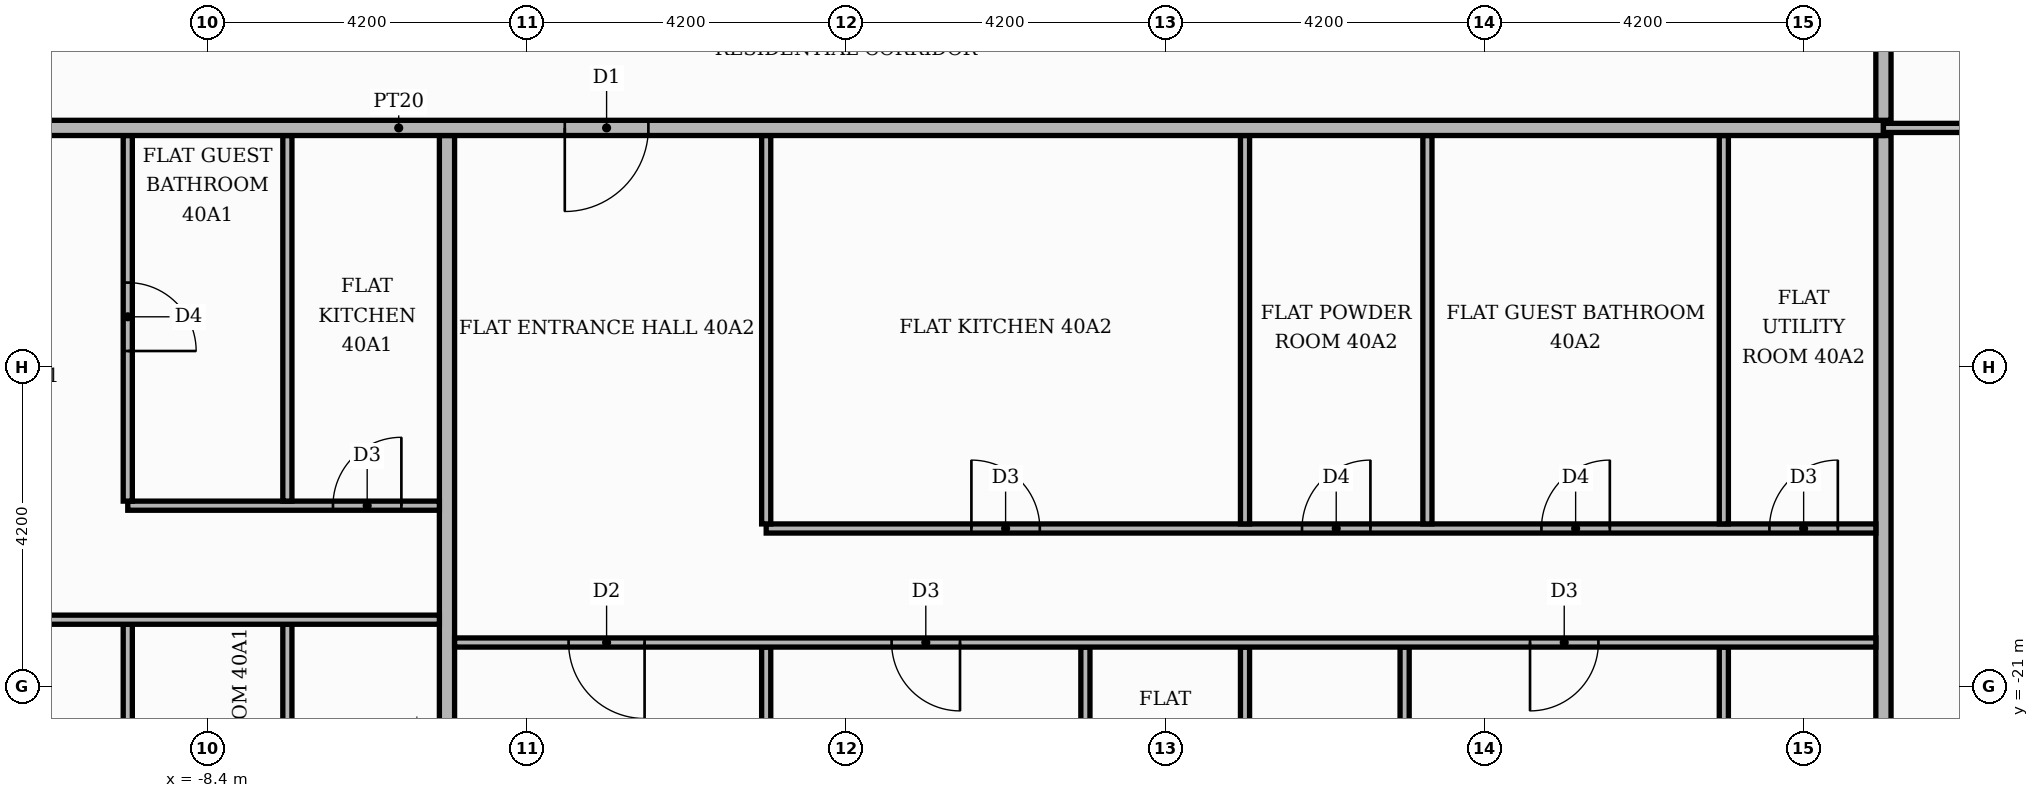
"""IFC4 building model, lengths in metres.
Left out: names, types, materials, properties, quantities, classifications, styles, units other than length and angle.
Written with IfcOpenShell. Run it as: python <this file> out.ifc"""

import sys

from ifc_helpers import new_model, si_unit, direction, frame, frame_2d, origin, place, context, subcontext, project, spatial, rectangle, extrude, element, fill, save


model = new_model("IFC4")
c1 = context("Model", 3, precision=1e-05, world=origin(), true_north=direction((0.0, 1.0)))
c2 = subcontext(c1, "Body", "Model", "MODEL_VIEW")
j1 = project(units=[si_unit("LENGTHUNIT", "METRE"), si_unit("PLANEANGLEUNIT", "RADIAN")], contexts=[c1])
p1 = place(None, origin())
s1 = spatial("IfcSite", under=j1, at=p1, CompositionType="ELEMENT")
p2 = place(p1, origin())
s2 = spatial("IfcBuilding", under=s1, at=p2, CompositionType="ELEMENT")
p3 = place(p2, frame((0.0, 0.0, 168.9)))
s3 = spatial("IfcBuildingStorey", under=s2, at=p3, CompositionType="ELEMENT", Elevation=168.9)
p4 = place(p3, frame((-9.45, -25.42, 0.0), z_axis=(0.0, 0.0, 1.0), x_axis=(0.0, 1.0, 0.0)))
e1 = element("IfcWall", 1, at=p4, inside=s3, PredefinedType="PARTITIONING", context=c2, shape_type="SweptSolid", body=[
    extrude(rectangle(XDim=5.24, YDim=0.12, at=frame_2d((2.62, 0.0))), origin(), (0.0, 0.0, 1.0), 3.48),
])
p5 = place(p4, frame((2.05, 0.0, 0.0)))
e2 = element("IfcOpeningElement", 2, at=p5, cuts=e1, PredefinedType="OPENING", context=c2, shape_type="SweptSolid", body=[
    extrude(rectangle(XDim=0.9, YDim=2.1, at=frame_2d((0.45, 1.05))), frame((0.0, 0.07, 0.0), z_axis=(0.0, -1.0, 0.0), x_axis=(1.0, 0.0, 0.0)), (0.0, 0.0, 1.0), 0.14),
])
p6 = place(p3, frame((-7.35, -25.42, 0.0), z_axis=(0.0, 0.0, 1.0), x_axis=(0.0, 1.0, 0.0)))
e3 = element("IfcWall", 3, at=p6, inside=s3, PredefinedType="PARTITIONING", context=c2, shape_type="SweptSolid", body=[
    extrude(rectangle(XDim=5.24, YDim=0.12, at=frame_2d((2.62, 0.0))), origin(), (0.0, 0.0, 1.0), 3.48),
])
p7 = place(p6, frame((2.05, 0.0, 0.0)))
e4 = element("IfcOpeningElement", 4, at=p7, cuts=e3, PredefinedType="OPENING", context=c2, shape_type="SweptSolid", body=[
    extrude(rectangle(XDim=0.9, YDim=2.1, at=frame_2d((0.45, 1.05))), frame((0.0, 0.07, 0.0), z_axis=(0.0, -1.0, 0.0), x_axis=(1.0, 0.0, 0.0)), (0.0, 0.0, 1.0), 0.14),
])
p8 = place(p3, frame((-5.25, -25.42, 0.0), z_axis=(0.0, 0.0, 1.0), x_axis=(0.0, 1.0, 0.0)))
e5 = element("IfcWall", 5, at=p8, inside=s3, PredefinedType="PARTITIONING", context=c2, shape_type="SweptSolid", body=[
    extrude(rectangle(XDim=11.67, YDim=0.2, at=frame_2d((5.835, 0.0))), origin(), (0.0, 0.0, 1.0), 3.48),
])
p9 = place(p3, frame((-1.05, -25.42, 0.0), z_axis=(0.0, 0.0, 1.0), x_axis=(0.0, 1.0, 0.0)))
e6 = element("IfcWall", 6, at=p9, inside=s3, PredefinedType="PARTITIONING", context=c2, shape_type="SweptSolid", body=[
    extrude(rectangle(XDim=4.94, YDim=0.12, at=frame_2d((2.47, 0.0))), origin(), (0.0, 0.0, 1.0), 3.48),
])
p10 = place(p3, frame((3.15, -25.42, 0.0), z_axis=(0.0, 0.0, 1.0), x_axis=(0.0, 1.0, 0.0)))
e7 = element("IfcWall", 7, at=p10, inside=s3, PredefinedType="PARTITIONING", context=c2, shape_type="SweptSolid", body=[
    extrude(rectangle(XDim=4.94, YDim=0.12, at=frame_2d((2.47, 0.0))), origin(), (0.0, 0.0, 1.0), 3.48),
])
p11 = place(p10, frame((1.9, 0.0, 0.0)))
e8 = element("IfcOpeningElement", 8, at=p11, cuts=e7, PredefinedType="OPENING", context=c2, shape_type="SweptSolid", body=[
    extrude(rectangle(XDim=0.9, YDim=2.1, at=frame_2d((0.45, 1.05))), frame((0.0, 0.07, 0.0), z_axis=(0.0, -1.0, 0.0), x_axis=(1.0, 0.0, 0.0)), (0.0, 0.0, 1.0), 0.14),
])
p12 = place(p3, frame((5.25, -25.42, 0.0), z_axis=(0.0, 0.0, 1.0), x_axis=(0.0, 1.0, 0.0)))
e9 = element("IfcWall", 9, at=p12, inside=s3, PredefinedType="PARTITIONING", context=c2, shape_type="SweptSolid", body=[
    extrude(rectangle(XDim=4.94, YDim=0.12, at=frame_2d((2.47, 0.0))), origin(), (0.0, 0.0, 1.0), 3.48),
])
p13 = place(p12, frame((1.9, 0.0, 0.0)))
e10 = element("IfcOpeningElement", 10, at=p13, cuts=e9, PredefinedType="OPENING", context=c2, shape_type="SweptSolid", body=[
    extrude(rectangle(XDim=0.9, YDim=2.1, at=frame_2d((0.45, 1.05))), frame((0.0, 0.07, 0.0), z_axis=(0.0, -1.0, 0.0), x_axis=(1.0, 0.0, 0.0)), (0.0, 0.0, 1.0), 0.14),
])
p14 = place(p3, frame((7.35, -25.42, 0.0), z_axis=(0.0, 0.0, 1.0), x_axis=(0.0, 1.0, 0.0)))
e11 = element("IfcWall", 11, at=p14, inside=s3, PredefinedType="PARTITIONING", context=c2, shape_type="SweptSolid", body=[
    extrude(rectangle(XDim=4.94, YDim=0.12, at=frame_2d((2.47, 0.0))), origin(), (0.0, 0.0, 1.0), 3.48),
])
p15 = place(p3, frame((11.55, -25.42, 0.0), z_axis=(0.0, 0.0, 1.0), x_axis=(0.0, 1.0, 0.0)))
e12 = element("IfcWall", 12, at=p15, inside=s3, PredefinedType="PARTITIONING", context=c2, shape_type="SweptSolid", body=[
    extrude(rectangle(XDim=4.94, YDim=0.12, at=frame_2d((2.47, 0.0))), origin(), (0.0, 0.0, 1.0), 3.48),
])
p16 = place(p15, frame((1.9, 0.0, 0.0)))
e13 = element("IfcOpeningElement", 13, at=p16, cuts=e12, PredefinedType="OPENING", context=c2, shape_type="SweptSolid", body=[
    extrude(rectangle(XDim=0.9, YDim=2.1, at=frame_2d((0.45, 1.05))), frame((0.0, 0.07, 0.0), z_axis=(0.0, -1.0, 0.0), x_axis=(1.0, 0.0, 0.0)), (0.0, 0.0, 1.0), 0.14),
])
p17 = place(p3, frame((13.65, -25.42, 0.0), z_axis=(0.0, 0.0, 1.0), x_axis=(0.0, 1.0, 0.0)))
e14 = element("IfcWall", 14, at=p17, inside=s3, PredefinedType="PARTITIONING", context=c2, shape_type="SweptSolid", body=[
    extrude(rectangle(XDim=11.67, YDim=0.2, at=frame_2d((5.835, 0.0))), origin(), (0.0, 0.0, 1.0), 3.48),
])
p18 = place(p3, frame((-5.15, -20.42, 0.0), z_axis=(0.0, 0.0, 1.0), x_axis=(1.0, 0.0, 0.0)))
e15 = element("IfcWall", 15, at=p18, inside=s3, PredefinedType="PARTITIONING", context=c2, shape_type="SweptSolid", body=[
    extrude(rectangle(XDim=18.7, YDim=0.12, at=frame_2d((9.35, 0.0))), origin(), (0.0, 0.0, 1.0), 3.48),
])
p19 = place(p18, frame((1.5, 0.0, 0.0)))
e16 = element("IfcOpeningElement", 16, at=p19, cuts=e15, PredefinedType="OPENING", context=c2, shape_type="SweptSolid", body=[
    extrude(rectangle(XDim=1.0, YDim=2.1, at=frame_2d((0.5, 1.05))), frame((0.0, 0.07, 0.0), z_axis=(0.0, -1.0, 0.0), x_axis=(1.0, 0.0, 0.0)), (0.0, 0.0, 1.0), 0.14),
])
p20 = place(p18, frame((5.75, 0.0, 0.0)))
e17 = element("IfcOpeningElement", 17, at=p20, cuts=e15, PredefinedType="OPENING", context=c2, shape_type="SweptSolid", body=[
    extrude(rectangle(XDim=0.9, YDim=2.1, at=frame_2d((0.45, 1.05))), frame((0.0, 0.07, 0.0), z_axis=(0.0, -1.0, 0.0), x_axis=(1.0, 0.0, 0.0)), (0.0, 0.0, 1.0), 0.14),
])
p21 = place(p18, frame((14.15, 0.0, 0.0)))
e18 = element("IfcOpeningElement", 18, at=p21, cuts=e15, PredefinedType="OPENING", context=c2, shape_type="SweptSolid", body=[
    extrude(rectangle(XDim=0.9, YDim=2.1, at=frame_2d((0.45, 1.05))), frame((0.0, 0.07, 0.0), z_axis=(0.0, -1.0, 0.0), x_axis=(1.0, 0.0, 0.0)), (0.0, 0.0, 1.0), 0.14),
])
p22 = place(p3, frame((-25.42, -20.12, 0.0), z_axis=(0.0, 0.0, 1.0), x_axis=(1.0, 0.0, 0.0)))
e19 = element("IfcWall", 19, at=p22, inside=s3, PredefinedType="PARTITIONING", context=c2, shape_type="SweptSolid", body=[
    extrude(rectangle(XDim=20.07, YDim=0.12, at=frame_2d((10.035, 0.0))), origin(), (0.0, 0.0, 1.0), 3.48),
])
p23 = place(p22, frame((10.22, 0.0, 0.0)))
e20 = element("IfcOpeningElement", 20, at=p23, cuts=e19, PredefinedType="OPENING", context=c2, shape_type="SweptSolid", body=[
    extrude(rectangle(XDim=1.0, YDim=2.1, at=frame_2d((0.5, 1.05))), frame((0.0, 0.07, 0.0), z_axis=(0.0, -1.0, 0.0), x_axis=(1.0, 0.0, 0.0)), (0.0, 0.0, 1.0), 0.14),
])
p24 = place(p22, frame((13.42, 0.0, 0.0)))
e21 = element("IfcOpeningElement", 21, at=p24, cuts=e19, PredefinedType="OPENING", context=c2, shape_type="SweptSolid", body=[
    extrude(rectangle(XDim=0.9, YDim=2.1, at=frame_2d((0.45, 1.05))), frame((0.0, 0.07, 0.0), z_axis=(0.0, -1.0, 0.0), x_axis=(1.0, 0.0, 0.0)), (0.0, 0.0, 1.0), 0.14),
])
p25 = place(p3, frame((-1.05, -18.92, 0.0), z_axis=(0.0, 0.0, 1.0), x_axis=(1.0, 0.0, 0.0)))
e22 = element("IfcWall", 22, at=p25, inside=s3, PredefinedType="PARTITIONING", context=c2, shape_type="SweptSolid", body=[
    extrude(rectangle(XDim=14.6, YDim=0.12, at=frame_2d((7.3, 0.0))), origin(), (0.0, 0.0, 1.0), 3.48),
])
p26 = place(p25, frame((2.7, 0.0, 0.0)))
e23 = element("IfcOpeningElement", 23, at=p26, cuts=e22, PredefinedType="OPENING", context=c2, shape_type="SweptSolid", body=[
    extrude(rectangle(XDim=0.9, YDim=2.1, at=frame_2d((0.45, 1.05))), frame((0.0, 0.07, 0.0), z_axis=(0.0, -1.0, 0.0), x_axis=(1.0, 0.0, 0.0)), (0.0, 0.0, 1.0), 0.14),
])
p27 = place(p25, frame((7.05, 0.0, 0.0)))
e24 = element("IfcOpeningElement", 24, at=p27, cuts=e22, PredefinedType="OPENING", context=c2, shape_type="SweptSolid", body=[
    extrude(rectangle(XDim=0.9, YDim=2.1, at=frame_2d((0.45, 1.05))), frame((0.0, 0.07, 0.0), z_axis=(0.0, -1.0, 0.0), x_axis=(1.0, 0.0, 0.0)), (0.0, 0.0, 1.0), 0.14),
])
p28 = place(p25, frame((10.2, 0.0, 0.0)))
e25 = element("IfcOpeningElement", 25, at=p28, cuts=e22, PredefinedType="OPENING", context=c2, shape_type="SweptSolid", body=[
    extrude(rectangle(XDim=0.9, YDim=2.1, at=frame_2d((0.45, 1.05))), frame((0.0, 0.07, 0.0), z_axis=(0.0, -1.0, 0.0), x_axis=(1.0, 0.0, 0.0)), (0.0, 0.0, 1.0), 0.14),
])
p29 = place(p25, frame((13.2, 0.0, 0.0)))
e26 = element("IfcOpeningElement", 26, at=p29, cuts=e22, PredefinedType="OPENING", context=c2, shape_type="SweptSolid", body=[
    extrude(rectangle(XDim=0.9, YDim=2.1, at=frame_2d((0.45, 1.05))), frame((0.0, 0.07, 0.0), z_axis=(0.0, -1.0, 0.0), x_axis=(1.0, 0.0, 0.0)), (0.0, 0.0, 1.0), 0.14),
])
for number, where, z_axis, x_axis in (
    (27, (-1.05, -18.86, 0.0), (0.0, 0.0, 1.0), (0.0, 1.0, 0.0)),
    (28, (5.25, -18.86, 0.0), (0.0, 0.0, 1.0), (0.0, 1.0, 0.0)),
    (29, (7.65, -18.86, 0.0), (0.0, 0.0, 1.0), (0.0, 1.0, 0.0)),
    (30, (11.55, -18.86, 0.0), (0.0, 0.0, 1.0), (0.0, 1.0, 0.0)),
):
    element("IfcWall", number, at=place(p3, frame(where, z_axis=z_axis, x_axis=x_axis)), inside=s3, PredefinedType="PARTITIONING", context=c2, shape_type="SweptSolid", body=[
        extrude(rectangle(XDim=5.11, YDim=0.12, at=frame_2d((2.555, 0.0))), origin(), (0.0, 0.0, 1.0), 3.48),
    ])
p30 = place(p3, frame((-9.45, -18.62, 0.0), z_axis=(0.0, 0.0, 1.0), x_axis=(1.0, 0.0, 0.0)))
e31 = element("IfcWall", 31, at=p30, inside=s3, PredefinedType="PARTITIONING", context=c2, shape_type="SweptSolid", body=[
    extrude(rectangle(XDim=4.1, YDim=0.12, at=frame_2d((2.05, 0.0))), origin(), (0.0, 0.0, 1.0), 3.48),
])
p31 = place(p30, frame((2.7, 0.0, 0.0)))
e32 = element("IfcOpeningElement", 32, at=p31, cuts=e31, PredefinedType="OPENING", context=c2, shape_type="SweptSolid", body=[
    extrude(rectangle(XDim=0.9, YDim=2.1, at=frame_2d((0.45, 1.05))), frame((0.0, 0.07, 0.0), z_axis=(0.0, -1.0, 0.0), x_axis=(1.0, 0.0, 0.0)), (0.0, 0.0, 1.0), 0.14),
])
p32 = place(p3, frame((-9.45, -18.56, 0.0), z_axis=(0.0, 0.0, 1.0), x_axis=(0.0, 1.0, 0.0)))
e33 = element("IfcWall", 33, at=p32, inside=s3, PredefinedType="PARTITIONING", context=c2, shape_type="SweptSolid", body=[
    extrude(rectangle(XDim=4.81, YDim=0.12, at=frame_2d((2.405, 0.0))), origin(), (0.0, 0.0, 1.0), 3.48),
])
p33 = place(p32, frame((1.975, 0.0, 0.0)))
e34 = element("IfcOpeningElement", 34, at=p33, cuts=e33, PredefinedType="OPENING", context=c2, shape_type="SweptSolid", body=[
    extrude(rectangle(XDim=0.9, YDim=2.1, at=frame_2d((0.45, 1.05))), frame((0.0, 0.07, 0.0), z_axis=(0.0, -1.0, 0.0), x_axis=(1.0, 0.0, 0.0)), (0.0, 0.0, 1.0), 0.14),
])
p34 = place(p3, frame((-7.35, -18.56, 0.0), z_axis=(0.0, 0.0, 1.0), x_axis=(0.0, 1.0, 0.0)))
e35 = element("IfcWall", 35, at=p34, inside=s3, PredefinedType="PARTITIONING", context=c2, shape_type="SweptSolid", body=[
    extrude(rectangle(XDim=4.81, YDim=0.12, at=frame_2d((2.405, 0.0))), origin(), (0.0, 0.0, 1.0), 3.48),
])
p35 = place(p3, frame((-25.42, -13.65, 0.0), z_axis=(0.0, 0.0, 1.0), x_axis=(1.0, 0.0, 0.0)))
e36 = element("IfcWall", 36, at=p35, inside=s3, PredefinedType="PARTITIONING", context=c2, shape_type="SweptSolid", body=[
    extrude(rectangle(XDim=39.07, YDim=0.2, at=frame_2d((19.535, 0.0))), origin(), (0.0, 0.0, 1.0), 3.48),
])
p36 = place(p35, frame((13.32, 0.0, 0.0)))
e37 = element("IfcOpeningElement", 37, at=p36, cuts=e36, PredefinedType="OPENING", context=c2, shape_type="SweptSolid", body=[
    extrude(rectangle(XDim=1.1, YDim=2.4, at=frame_2d((0.55, 1.2))), frame((0.0, 0.11, 0.0), z_axis=(0.0, -1.0, 0.0), x_axis=(1.0, 0.0, 0.0)), (0.0, 0.0, 1.0), 0.22),
])
p37 = place(p35, frame((21.72, 0.0, 0.0)))
e38 = element("IfcOpeningElement", 38, at=p37, cuts=e36, PredefinedType="OPENING", context=c2, shape_type="SweptSolid", body=[
    extrude(rectangle(XDim=1.1, YDim=2.4, at=frame_2d((0.55, 1.2))), frame((0.0, 0.11, 0.0), z_axis=(0.0, -1.0, 0.0), x_axis=(1.0, 0.0, 0.0)), (0.0, 0.0, 1.0), 0.22),
])
p38 = place(p3, frame((13.65, -13.65, 0.0), z_axis=(0.0, 0.0, 1.0), x_axis=(1.0, 0.0, 0.0)))
e39 = element("IfcWall", 39, at=p38, inside=s3, PredefinedType="PARTITIONING", context=c2, shape_type="SweptSolid", body=[
    extrude(rectangle(XDim=6.17, YDim=0.12, at=frame_2d((3.085, 0.0))), origin(), (0.0, 0.0, 1.0), 3.48),
])
p39 = place(p38, frame((2.635, 0.0, 0.0)))
e40 = element("IfcOpeningElement", 40, at=p39, cuts=e39, PredefinedType="OPENING", context=c2, shape_type="SweptSolid", body=[
    extrude(rectangle(XDim=0.9, YDim=2.1, at=frame_2d((0.45, 1.05))), frame((0.0, 0.07, 0.0), z_axis=(0.0, -1.0, 0.0), x_axis=(1.0, 0.0, 0.0)), (0.0, 0.0, 1.0), 0.14),
])
p40 = place(p3, frame((13.65, -13.55, 0.0), z_axis=(0.0, 0.0, 1.0), x_axis=(0.0, 1.0, 0.0)))
e41 = element("IfcWall", 41, at=p40, inside=s3, PredefinedType="PARTITIONING", context=c2, shape_type="SweptSolid", body=[
    extrude(rectangle(XDim=2.45, YDim=0.2, at=frame_2d((1.225, 0.0))), origin(), (0.0, 0.0, 1.0), 3.48),
])
p41 = place(p33, frame((0.9, 0.0, 0.0), z_axis=(0.0, 0.0, 1.0), x_axis=(-1.0, 0.0, 0.0)))
e42 = element("IfcDoor", 42, at=p41, inside=s3, OperationType="SINGLE_SWING_LEFT", PredefinedType="DOOR", context=c2, shape_type="SweptSolid", body=[
    extrude(rectangle(XDim=0.9, YDim=2.1, at=frame_2d((0.45, 1.05))), frame((0.0, 0.025, 0.0), z_axis=(0.0, -1.0, 0.0), x_axis=(1.0, 0.0, 0.0)), (0.0, 0.0, 1.0), 0.05),
])
fill(e34, e42)
p42 = place(p31, origin())
e43 = element("IfcDoor", 43, at=p42, inside=s3, OperationType="SINGLE_SWING_RIGHT", PredefinedType="DOOR", context=c2, shape_type="SweptSolid", body=[
    extrude(rectangle(XDim=0.9, YDim=2.1, at=frame_2d((0.45, 1.05))), frame((0.0, 0.025, 0.0), z_axis=(0.0, -1.0, 0.0), x_axis=(1.0, 0.0, 0.0)), (0.0, 0.0, 1.0), 0.05),
])
fill(e32, e43)
p43 = place(p37, frame((1.1, 0.0, 0.0), z_axis=(0.0, 0.0, 1.0), x_axis=(-1.0, 0.0, 0.0)))
e44 = element("IfcDoor", 44, at=p43, inside=s3, OperationType="SINGLE_SWING_LEFT", PredefinedType="DOOR", context=c2, shape_type="SweptSolid", body=[
    extrude(rectangle(XDim=1.1, YDim=2.4, at=frame_2d((0.55, 1.2))), frame((0.0, 0.025, 0.0), z_axis=(0.0, -1.0, 0.0), x_axis=(1.0, 0.0, 0.0)), (0.0, 0.0, 1.0), 0.05),
])
fill(e38, e44)
p44 = place(p26, origin())
e45 = element("IfcDoor", 45, at=p44, inside=s3, OperationType="SINGLE_SWING_LEFT", PredefinedType="DOOR", context=c2, shape_type="SweptSolid", body=[
    extrude(rectangle(XDim=0.9, YDim=2.1, at=frame_2d((0.45, 1.05))), frame((0.0, 0.025, 0.0), z_axis=(0.0, -1.0, 0.0), x_axis=(1.0, 0.0, 0.0)), (0.0, 0.0, 1.0), 0.05),
])
fill(e23, e45)
p45 = place(p27, origin())
e46 = element("IfcDoor", 46, at=p45, inside=s3, OperationType="SINGLE_SWING_RIGHT", PredefinedType="DOOR", context=c2, shape_type="SweptSolid", body=[
    extrude(rectangle(XDim=0.9, YDim=2.1, at=frame_2d((0.45, 1.05))), frame((0.0, 0.025, 0.0), z_axis=(0.0, -1.0, 0.0), x_axis=(1.0, 0.0, 0.0)), (0.0, 0.0, 1.0), 0.05),
])
fill(e24, e46)
p46 = place(p28, origin())
e47 = element("IfcDoor", 47, at=p46, inside=s3, OperationType="SINGLE_SWING_RIGHT", PredefinedType="DOOR", context=c2, shape_type="SweptSolid", body=[
    extrude(rectangle(XDim=0.9, YDim=2.1, at=frame_2d((0.45, 1.05))), frame((0.0, 0.025, 0.0), z_axis=(0.0, -1.0, 0.0), x_axis=(1.0, 0.0, 0.0)), (0.0, 0.0, 1.0), 0.05),
])
fill(e25, e47)
p47 = place(p29, origin())
e48 = element("IfcDoor", 48, at=p47, inside=s3, OperationType="SINGLE_SWING_RIGHT", PredefinedType="DOOR", context=c2, shape_type="SweptSolid", body=[
    extrude(rectangle(XDim=0.9, YDim=2.1, at=frame_2d((0.45, 1.05))), frame((0.0, 0.025, 0.0), z_axis=(0.0, -1.0, 0.0), x_axis=(1.0, 0.0, 0.0)), (0.0, 0.0, 1.0), 0.05),
])
fill(e26, e48)
p48 = place(p19, frame((1.0, 0.0, 0.0), z_axis=(0.0, 0.0, 1.0), x_axis=(-1.0, 0.0, 0.0)))
e49 = element("IfcDoor", 49, at=p48, inside=s3, OperationType="SINGLE_SWING_RIGHT", PredefinedType="DOOR", context=c2, shape_type="SweptSolid", body=[
    extrude(rectangle(XDim=1.0, YDim=2.1, at=frame_2d((0.5, 1.05))), frame((0.0, 0.025, 0.0), z_axis=(0.0, -1.0, 0.0), x_axis=(1.0, 0.0, 0.0)), (0.0, 0.0, 1.0), 0.05),
])
fill(e16, e49)
p49 = place(p20, frame((0.9, 0.0, 0.0), z_axis=(0.0, 0.0, 1.0), x_axis=(-1.0, 0.0, 0.0)))
e50 = element("IfcDoor", 50, at=p49, inside=s3, OperationType="SINGLE_SWING_RIGHT", PredefinedType="DOOR", context=c2, shape_type="SweptSolid", body=[
    extrude(rectangle(XDim=0.9, YDim=2.1, at=frame_2d((0.45, 1.05))), frame((0.0, 0.025, 0.0), z_axis=(0.0, -1.0, 0.0), x_axis=(1.0, 0.0, 0.0)), (0.0, 0.0, 1.0), 0.05),
])
fill(e17, e50)
p50 = place(p21, frame((0.9, 0.0, 0.0), z_axis=(0.0, 0.0, 1.0), x_axis=(-1.0, 0.0, 0.0)))
e51 = element("IfcDoor", 51, at=p50, inside=s3, OperationType="SINGLE_SWING_LEFT", PredefinedType="DOOR", context=c2, shape_type="SweptSolid", body=[
    extrude(rectangle(XDim=0.9, YDim=2.1, at=frame_2d((0.45, 1.05))), frame((0.0, 0.025, 0.0), z_axis=(0.0, -1.0, 0.0), x_axis=(1.0, 0.0, 0.0)), (0.0, 0.0, 1.0), 0.05),
])
fill(e18, e51)
save(model, sys.argv[1])
